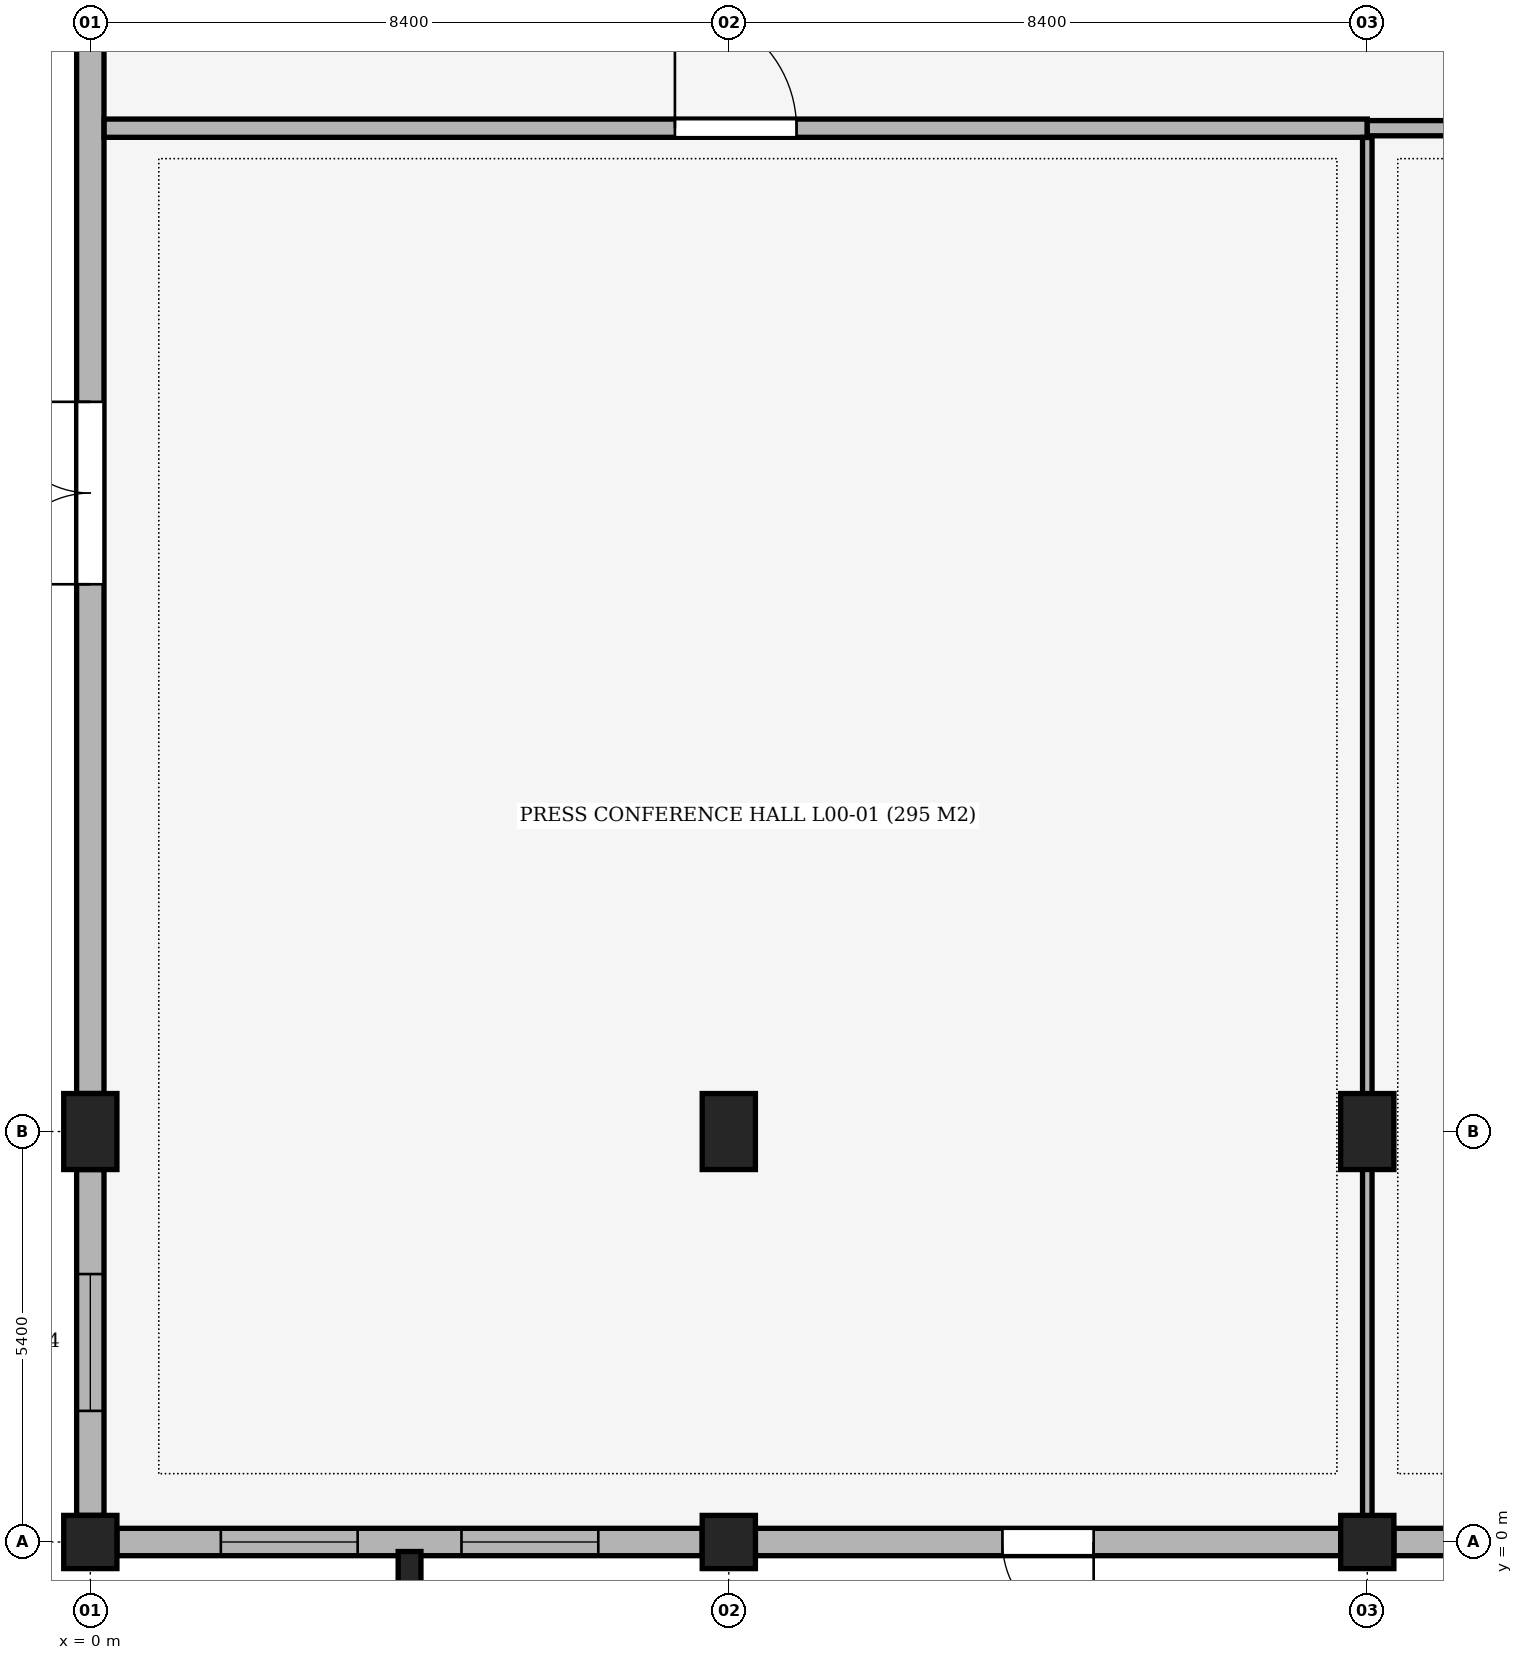
"""IFC4 building model, lengths in metres.
Left out: names, types, materials, properties, quantities, classifications, styles, units other than length and angle.
Written with IfcOpenShell. Run it as: python <this file> out.ifc"""

import sys

from ifc_helpers import new_model, si_unit, direction, frame, frame_2d, origin, origin_with_axes, origin_2d, place, context, subcontext, project, spatial, rectangle, extrude, element, fill, save


model = new_model("IFC4")
c1 = context("Model", 3, precision=1e-05, world=origin(), true_north=direction((0.0, 1.0)))
c2 = subcontext(c1, "Body", "Model", "MODEL_VIEW")
j1 = project(units=[si_unit("LENGTHUNIT", "METRE"), si_unit("PLANEANGLEUNIT", "RADIAN")], contexts=[c1])
p1 = place(None, origin())
s1 = spatial("IfcSite", under=j1, at=p1, CompositionType="ELEMENT")
p2 = place(p1, origin())
s2 = spatial("IfcBuilding", under=s1, at=p2, CompositionType="ELEMENT")
p3 = place(p2, origin())
s3 = spatial("IfcBuildingStorey", under=s2, at=p3, CompositionType="ELEMENT", Elevation=0.0)
p4 = place(p3, origin_with_axes())
e1 = element("IfcColumn", 1, at=p4, inside=s3, PredefinedType="COLUMN", context=c2, shape_type="SweptSolid", body=[
    extrude(rectangle(XDim=0.7, YDim=0.7, at=origin_2d()), origin(), (0.0, 0.0, 1.0), 5.1),
])
p5 = place(p3, frame((0.0, 5.4, 0.0), z_axis=(0.0, 0.0, 1.0), x_axis=(1.0, 0.0, 0.0)))
e2 = element("IfcColumn", 2, at=p5, inside=s3, PredefinedType="COLUMN", context=c2, shape_type="SweptSolid", body=[
    extrude(rectangle(XDim=0.7, YDim=1.0, at=origin_2d()), origin(), (0.0, 0.0, 1.0), 5.1),
])
p6 = place(p3, frame((8.4, 0.0, 0.0), z_axis=(0.0, 0.0, 1.0), x_axis=(1.0, 0.0, 0.0)))
e3 = element("IfcColumn", 3, at=p6, inside=s3, PredefinedType="COLUMN", context=c2, shape_type="SweptSolid", body=[
    extrude(rectangle(XDim=0.7, YDim=0.7, at=origin_2d()), origin(), (0.0, 0.0, 1.0), 5.1),
])
p7 = place(p3, frame((8.4, 5.4, 0.0), z_axis=(0.0, 0.0, 1.0), x_axis=(1.0, 0.0, 0.0)))
e4 = element("IfcColumn", 4, at=p7, inside=s3, PredefinedType="COLUMN", context=c2, shape_type="SweptSolid", body=[
    extrude(rectangle(XDim=0.7, YDim=1.0, at=origin_2d()), origin(), (0.0, 0.0, 1.0), 5.1),
])
p8 = place(p3, frame((16.8, 0.0, 0.0), z_axis=(0.0, 0.0, 1.0), x_axis=(1.0, 0.0, 0.0)))
e5 = element("IfcColumn", 5, at=p8, inside=s3, PredefinedType="COLUMN", context=c2, shape_type="SweptSolid", body=[
    extrude(rectangle(XDim=0.7, YDim=0.7, at=origin_2d()), origin(), (0.0, 0.0, 1.0), 5.1),
])
p9 = place(p3, frame((16.8, 5.4, 0.0), z_axis=(0.0, 0.0, 1.0), x_axis=(1.0, 0.0, 0.0)))
e6 = element("IfcColumn", 6, at=p9, inside=s3, PredefinedType="COLUMN", context=c2, shape_type="SweptSolid", body=[
    extrude(rectangle(XDim=0.7, YDim=1.0, at=origin_2d()), origin(), (0.0, 0.0, 1.0), 5.1),
])
p10 = place(p3, frame((4.2, -0.35, 0.0), z_axis=(0.0, 0.0, 1.0), x_axis=(1.0, 0.0, 0.0)))
e7 = element("IfcColumn", 7, at=p10, inside=s3, PredefinedType="PILASTER", context=c2, shape_type="SweptSolid", body=[
    extrude(rectangle(XDim=0.3, YDim=0.45, at=origin_2d()), origin(), (0.0, 0.0, 1.0), 5.1),
])
p11 = place(p3, frame((24.85, 0.0, 0.0), z_axis=(0.0, 0.0, 1.0), x_axis=(-1.0, 0.0, 0.0)))
e8 = element("IfcWall", 8, at=p11, inside=s3, PredefinedType="SOLIDWALL", context=c2, shape_type="SweptSolid", body=[
    extrude(rectangle(XDim=7.7, YDim=0.36, at=frame_2d((3.85, 0.0))), origin(), (0.0, 0.0, 1.0), 4.07),
])
p12 = place(p11, frame((1.367, 0.0, 0.85)))
e9 = element("IfcOpeningElement", 9, at=p12, cuts=e8, PredefinedType="OPENING", context=c2, shape_type="SweptSolid", body=[
    extrude(rectangle(XDim=1.8, YDim=2.4, at=frame_2d((0.9, 1.2))), frame((0.0, 0.195, 0.0), z_axis=(0.0, -1.0, 0.0), x_axis=(1.0, 0.0, 0.0)), (0.0, 0.0, 1.0), 0.39),
])
p13 = place(p11, frame((4.533, 0.0, 0.85)))
e10 = element("IfcOpeningElement", 10, at=p13, cuts=e8, PredefinedType="OPENING", context=c2, shape_type="SweptSolid", body=[
    extrude(rectangle(XDim=1.8, YDim=2.4, at=frame_2d((0.9, 1.2))), frame((0.0, 0.195, 0.0), z_axis=(0.0, -1.0, 0.0), x_axis=(1.0, 0.0, 0.0)), (0.0, 0.0, 1.0), 0.39),
])
p14 = place(p3, frame((16.45, 0.0, 0.0), z_axis=(0.0, 0.0, 1.0), x_axis=(-1.0, 0.0, 0.0)))
e11 = element("IfcWall", 11, at=p14, inside=s3, PredefinedType="SOLIDWALL", context=c2, shape_type="SweptSolid", body=[
    extrude(rectangle(XDim=7.7, YDim=0.36, at=frame_2d((3.85, 0.0))), origin(), (0.0, 0.0, 1.0), 4.07),
])
p15 = place(p14, frame((3.25, 0.0, 0.0)))
e12 = element("IfcOpeningElement", 12, at=p15, cuts=e11, PredefinedType="OPENING", context=c2, shape_type="SweptSolid", body=[
    extrude(rectangle(XDim=1.2, YDim=2.2, at=frame_2d((0.6, 1.1))), frame((0.0, 0.195, 0.0), z_axis=(0.0, -1.0, 0.0), x_axis=(1.0, 0.0, 0.0)), (0.0, 0.0, 1.0), 0.39),
])
p16 = place(p3, frame((8.05, 0.0, 0.0), z_axis=(0.0, 0.0, 1.0), x_axis=(-1.0, 0.0, 0.0)))
e13 = element("IfcWall", 13, at=p16, inside=s3, PredefinedType="SOLIDWALL", context=c2, shape_type="SweptSolid", body=[
    extrude(rectangle(XDim=7.7, YDim=0.36, at=frame_2d((3.85, 0.0))), origin(), (0.0, 0.0, 1.0), 4.07),
])
p17 = place(p16, frame((1.367, 0.0, 0.85)))
e14 = element("IfcOpeningElement", 14, at=p17, cuts=e13, PredefinedType="OPENING", context=c2, shape_type="SweptSolid", body=[
    extrude(rectangle(XDim=1.8, YDim=2.4, at=frame_2d((0.9, 1.2))), frame((0.0, 0.195, 0.0), z_axis=(0.0, -1.0, 0.0), x_axis=(1.0, 0.0, 0.0)), (0.0, 0.0, 1.0), 0.39),
])
p18 = place(p16, frame((4.533, 0.0, 0.85)))
e15 = element("IfcOpeningElement", 15, at=p18, cuts=e13, PredefinedType="OPENING", context=c2, shape_type="SweptSolid", body=[
    extrude(rectangle(XDim=1.8, YDim=2.4, at=frame_2d((0.9, 1.2))), frame((0.0, 0.195, 0.0), z_axis=(0.0, -1.0, 0.0), x_axis=(1.0, 0.0, 0.0)), (0.0, 0.0, 1.0), 0.39),
])
p19 = place(p3, frame((0.0, 0.35, 0.0), z_axis=(0.0, 0.0, 1.0), x_axis=(0.0, 1.0, 0.0)))
e16 = element("IfcWall", 16, at=p19, inside=s3, PredefinedType="SOLIDWALL", context=c2, shape_type="SweptSolid", body=[
    extrude(rectangle(XDim=4.55, YDim=0.36, at=frame_2d((2.275, 0.0))), origin(), (0.0, 0.0, 1.0), 4.17),
])
p20 = place(p19, frame((1.375, 0.0, 0.85)))
e17 = element("IfcOpeningElement", 17, at=p20, cuts=e16, PredefinedType="OPENING", context=c2, shape_type="SweptSolid", body=[
    extrude(rectangle(XDim=1.8, YDim=2.4, at=frame_2d((0.9, 1.2))), frame((0.0, 0.195, 0.0), z_axis=(0.0, -1.0, 0.0), x_axis=(1.0, 0.0, 0.0)), (0.0, 0.0, 1.0), 0.39),
])
p21 = place(p3, frame((0.0, 5.9, 0.0), z_axis=(0.0, 0.0, 1.0), x_axis=(0.0, 1.0, 0.0)))
e18 = element("IfcWall", 18, at=p21, inside=s3, PredefinedType="SOLIDWALL", context=c2, shape_type="SweptSolid", body=[
    extrude(rectangle(XDim=15.8, YDim=0.36, at=frame_2d((7.9, 0.0))), origin(), (0.0, 0.0, 1.0), 3.67),
])
p22 = place(p21, frame((6.7, 0.0, 0.0)))
e19 = element("IfcOpeningElement", 19, at=p22, cuts=e18, PredefinedType="OPENING", context=c2, shape_type="SweptSolid", body=[
    extrude(rectangle(XDim=2.4, YDim=2.6, at=frame_2d((1.2, 1.3))), frame((0.0, 0.195, 0.0), z_axis=(0.0, -1.0, 0.0), x_axis=(1.0, 0.0, 0.0)), (0.0, 0.0, 1.0), 0.39),
])
p23 = place(p3, frame((0.182, 18.6, 0.0), z_axis=(0.0, 0.0, 1.0), x_axis=(1.0, 0.0, 0.0)))
e20 = element("IfcWall", 20, at=p23, inside=s3, PredefinedType="PARTITIONING", context=c2, shape_type="SweptSolid", body=[
    extrude(rectangle(XDim=16.618, YDim=0.24, at=frame_2d((8.309, 0.0))), origin(), (0.0, 0.0, 1.0), 3.67),
])
p24 = place(p23, frame((7.509, 0.0, 0.0)))
e21 = element("IfcOpeningElement", 21, at=p24, cuts=e20, PredefinedType="OPENING", context=c2, shape_type="SweptSolid", body=[
    extrude(rectangle(XDim=1.6, YDim=2.3, at=frame_2d((0.8, 1.15))), frame((0.0, 0.135, 0.0), z_axis=(0.0, -1.0, 0.0), x_axis=(1.0, 0.0, 0.0)), (0.0, 0.0, 1.0), 0.27),
])
p25 = place(p3, frame((16.8, 18.6, 0.0), z_axis=(0.0, 0.0, 1.0), x_axis=(1.0, 0.0, 0.0)))
e22 = element("IfcWall", 22, at=p25, inside=s3, PredefinedType="PARTITIONING", context=c2, shape_type="SweptSolid", body=[
    extrude(rectangle(XDim=16.3, YDim=0.2, at=frame_2d((8.15, 0.0))), origin(), (0.0, 0.0, 1.0), 3.67),
])
p26 = place(p25, frame((7.35, 0.0, 0.0)))
e23 = element("IfcOpeningElement", 23, at=p26, cuts=e22, PredefinedType="OPENING", context=c2, shape_type="SweptSolid", body=[
    extrude(rectangle(XDim=1.6, YDim=2.3, at=frame_2d((0.8, 1.15))), frame((0.0, 0.115, 0.0), z_axis=(0.0, -1.0, 0.0), x_axis=(1.0, 0.0, 0.0)), (0.0, 0.0, 1.0), 0.23),
])
p27 = place(p3, frame((16.8, 0.065, 0.0), z_axis=(0.0, 0.0, 1.0), x_axis=(0.0, 1.0, 0.0)))
e24 = element("IfcWall", 24, at=p27, inside=s3, PredefinedType="PARTITIONING", context=c2, shape_type="SweptSolid", body=[
    extrude(rectangle(XDim=18.413, YDim=0.125, at=frame_2d((9.207, 0.0))), origin(), (0.0, 0.0, 1.0), 3.67),
])
p28 = place(p15, origin())
e25 = element("IfcDoor", 25, at=p28, inside=s3, OperationType="SINGLE_SWING_LEFT", PredefinedType="DOOR", context=c2, shape_type="SweptSolid", body=[
    extrude(rectangle(XDim=1.2, YDim=2.2, at=frame_2d((0.6, 1.1))), frame((0.0, 0.025, 0.0), z_axis=(0.0, -1.0, 0.0), x_axis=(1.0, 0.0, 0.0)), (0.0, 0.0, 1.0), 0.05),
])
fill(e12, e25)
p29 = place(p17, origin())
e26 = element("IfcWindow", 26, at=p29, inside=s3, PartitioningType="SINGLE_PANEL", PredefinedType="WINDOW", context=c2, shape_type="SweptSolid", body=[
    extrude(rectangle(XDim=1.8, YDim=2.4, at=frame_2d((0.9, 1.2))), frame((0.0, 0.03, 0.0), z_axis=(0.0, -1.0, 0.0), x_axis=(1.0, 0.0, 0.0)), (0.0, 0.0, 1.0), 0.06),
])
fill(e14, e26)
p30 = place(p18, origin())
e27 = element("IfcWindow", 27, at=p30, inside=s3, PartitioningType="SINGLE_PANEL", PredefinedType="WINDOW", context=c2, shape_type="SweptSolid", body=[
    extrude(rectangle(XDim=1.8, YDim=2.4, at=frame_2d((0.9, 1.2))), frame((0.0, 0.03, 0.0), z_axis=(0.0, -1.0, 0.0), x_axis=(1.0, 0.0, 0.0)), (0.0, 0.0, 1.0), 0.06),
])
fill(e15, e27)
p31 = place(p20, origin())
e28 = element("IfcWindow", 28, at=p31, inside=s3, PartitioningType="SINGLE_PANEL", PredefinedType="WINDOW", context=c2, shape_type="SweptSolid", body=[
    extrude(rectangle(XDim=1.8, YDim=2.4, at=frame_2d((0.9, 1.2))), frame((0.0, 0.03, 0.0), z_axis=(0.0, -1.0, 0.0), x_axis=(1.0, 0.0, 0.0)), (0.0, 0.0, 1.0), 0.06),
])
fill(e17, e28)
p32 = place(p22, origin())
e29 = element("IfcDoor", 29, at=p32, inside=s3, OperationType="DOUBLE_DOOR_SINGLE_SWING", PredefinedType="DOOR", context=c2, shape_type="SweptSolid", body=[
    extrude(rectangle(XDim=2.4, YDim=2.6, at=frame_2d((1.2, 1.3))), frame((0.0, 0.025, 0.0), z_axis=(0.0, -1.0, 0.0), x_axis=(1.0, 0.0, 0.0)), (0.0, 0.0, 1.0), 0.05),
])
fill(e19, e29)
p33 = place(p24, origin())
e30 = element("IfcDoor", 30, at=p33, inside=s3, OperationType="SINGLE_SWING_LEFT", PredefinedType="DOOR", context=c2, shape_type="SweptSolid", body=[
    extrude(rectangle(XDim=1.6, YDim=2.3, at=frame_2d((0.8, 1.15))), frame((0.0, 0.025, 0.0), z_axis=(0.0, -1.0, 0.0), x_axis=(1.0, 0.0, 0.0)), (0.0, 0.0, 1.0), 0.05),
])
fill(e21, e30)
save(model, sys.argv[1])
